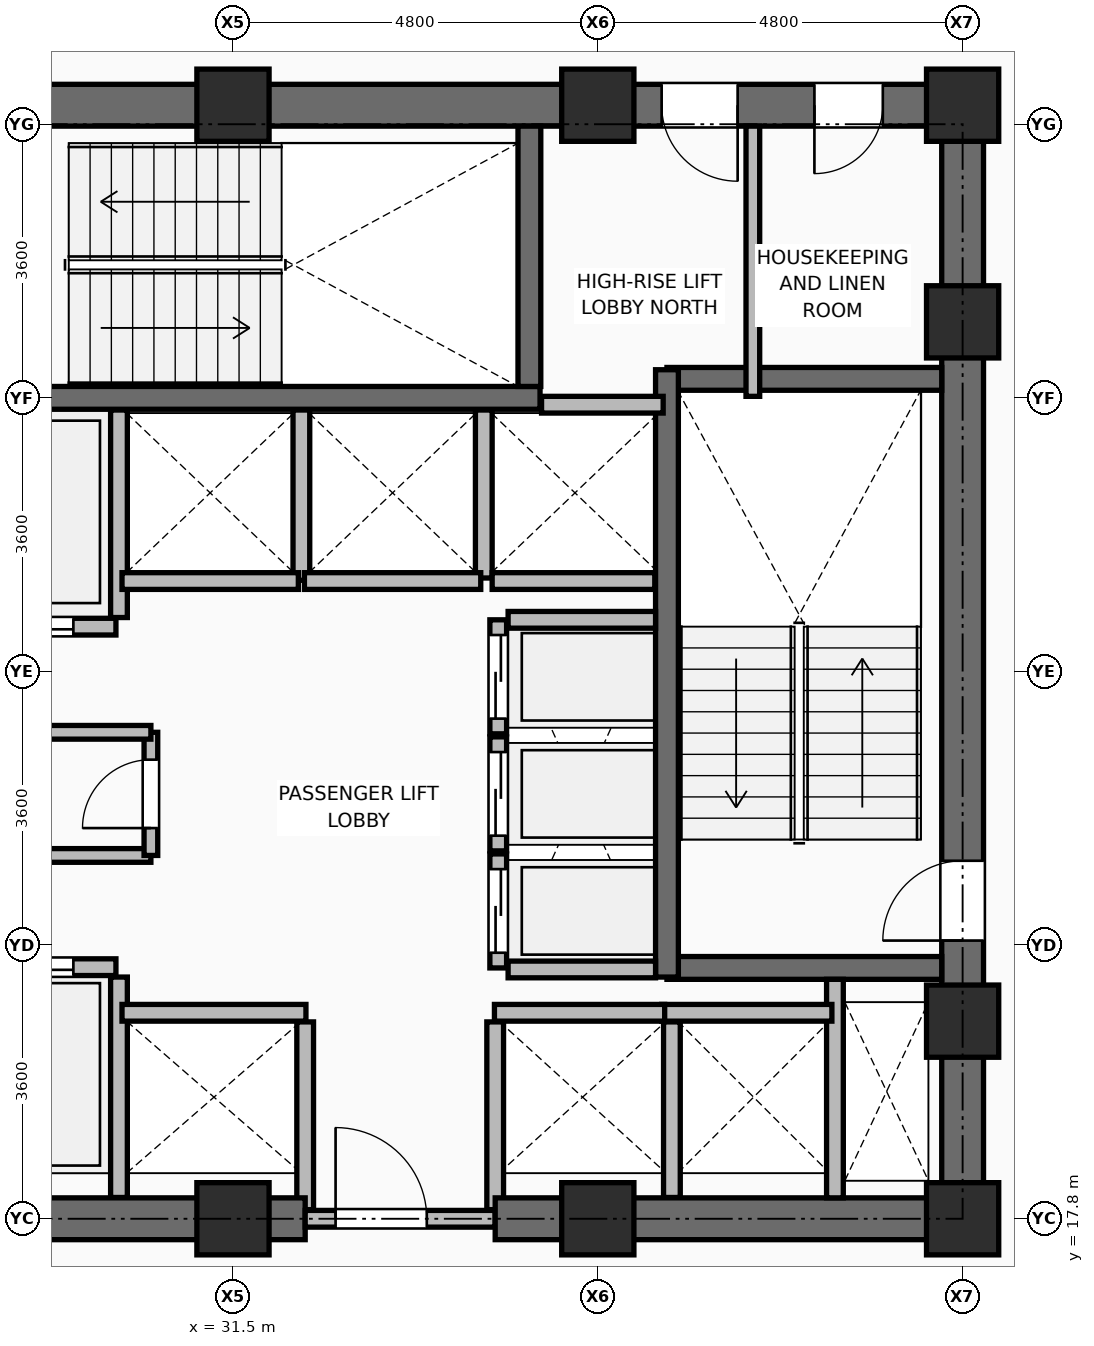
"""IFC4 building model, lengths in metres.
Left out: names, types, materials, properties, quantities, classifications, styles, units other than length and angle.
Written with IfcOpenShell. Run it as: python <this file> out.ifc"""

import sys

from ifc_helpers import new_model, si_unit, direction, frame, frame_2d, origin, origin_2d, place, context, subcontext, project, spatial, rectangle, extrude, element, fill, save


model = new_model("IFC4")
c1 = context("Model", 3, precision=1e-05, world=origin(), true_north=direction((0.0, 1.0)))
c2 = subcontext(c1, "Body", "Model", "MODEL_VIEW")
j1 = project(units=[si_unit("LENGTHUNIT", "METRE"), si_unit("PLANEANGLEUNIT", "RADIAN")], contexts=[c1])
p1 = place(None, origin())
s1 = spatial("IfcSite", under=j1, at=p1, CompositionType="ELEMENT")
p2 = place(p1, origin())
s2 = spatial("IfcBuilding", under=s1, at=p2, CompositionType="ELEMENT")
p3 = place(p2, frame((0.0, 0.0, 145.95)))
s3 = spatial("IfcBuildingStorey", under=s2, at=p3, CompositionType="ELEMENT", Elevation=145.95)
for number, where, z_axis, x_axis in (
    (1, (31.5, 17.8, 0.0), (0.0, 0.0, 1.0), (1.0, 0.0, 0.0)),
    (2, (36.3, 17.8, 0.0), (0.0, 0.0, 1.0), (1.0, 0.0, 0.0)),
    (3, (41.1, 17.8, 0.0), (0.0, 0.0, 1.0), (1.0, 0.0, 0.0)),
    (4, (41.1, 20.4, 0.0), (0.0, 0.0, 1.0), (1.0, 0.0, 0.0)),
    (5, (41.1, 29.6, 0.0), (0.0, 0.0, 1.0), (1.0, 0.0, 0.0)),
    (6, (31.5, 32.45, 0.0), (0.0, 0.0, 1.0), (1.0, 0.0, 0.0)),
    (7, (36.3, 32.45, 0.0), (0.0, 0.0, 1.0), (1.0, 0.0, 0.0)),
    (8, (41.1, 32.45, 0.0), (0.0, 0.0, 1.0), (1.0, 0.0, 0.0)),
):
    element("IfcColumn", number, at=place(p3, frame(where, z_axis=z_axis, x_axis=x_axis)), inside=s3, PredefinedType="COLUMN", context=c2, shape_type="SweptSolid", body=[
        extrude(rectangle(XDim=0.95, YDim=0.95, at=origin_2d()), origin(), (0.0, 0.0, 1.0), 3.75),
    ])
p4 = place(p3, frame((30.0, 18.08, 0.0), z_axis=(0.0, 0.0, 1.0), x_axis=(0.0, 1.0, 0.0)))
e9 = element("IfcWall", 9, at=p4, inside=s3, PredefinedType="PARTITIONING", context=c2, shape_type="SweptSolid", body=[
    extrude(rectangle(XDim=2.9, YDim=0.22, at=frame_2d((1.45, 0.0))), origin(), (0.0, 0.0, 1.0), 3.545),
])
for number, where, z_axis, x_axis in (
    (10, (32.45, 17.92, 0.0), (0.0, 0.0, 1.0), (0.0, 1.0, 0.0)),
    (11, (34.95, 17.92, 0.0), (0.0, 0.0, 1.0), (0.0, 1.0, 0.0)),
):
    element("IfcWall", number, at=place(p3, frame(where, z_axis=z_axis, x_axis=x_axis)), inside=s3, PredefinedType="PARTITIONING", context=c2, shape_type="SweptSolid", body=[
        extrude(rectangle(XDim=2.47, YDim=0.22, at=frame_2d((1.235, 0.0))), origin(), (0.0, 0.0, 1.0), 3.006),
    ])
p5 = place(p3, frame((37.275, 18.08, 0.0), z_axis=(0.0, 0.0, 1.0), x_axis=(0.0, 1.0, 0.0)))
e12 = element("IfcWall", 12, at=p5, inside=s3, PredefinedType="PARTITIONING", context=c2, shape_type="SweptSolid", body=[
    extrude(rectangle(XDim=2.31, YDim=0.22, at=frame_2d((1.155, 0.0))), origin(), (0.0, 0.0, 1.0), 3.545),
])
p6 = place(p3, frame((30.0, 25.71, 0.0), z_axis=(0.0, 0.0, 1.0), x_axis=(0.0, 1.0, 0.0)))
e13 = element("IfcWall", 13, at=p6, inside=s3, PredefinedType="PARTITIONING", context=c2, shape_type="SweptSolid", body=[
    extrude(rectangle(XDim=2.73, YDim=0.22, at=frame_2d((1.365, 0.0))), origin(), (0.0, 0.0, 1.0), 3.545),
])
p7 = place(p3, frame((32.4, 26.2, 0.0), z_axis=(0.0, 0.0, 1.0), x_axis=(0.0, 1.0, 0.0)))
e14 = element("IfcWall", 14, at=p7, inside=s3, PredefinedType="PARTITIONING", context=c2, shape_type="SweptSolid", body=[
    extrude(rectangle(XDim=2.24, YDim=0.22, at=frame_2d((1.12, 0.0))), origin(), (0.0, 0.0, 1.0), 3.545),
])
p8 = place(p3, frame((34.8, 26.23, 0.0), z_axis=(0.0, 0.0, 1.0), x_axis=(0.0, 1.0, 0.0)))
e15 = element("IfcWall", 15, at=p8, inside=s3, PredefinedType="PARTITIONING", context=c2, shape_type="SweptSolid", body=[
    extrude(rectangle(XDim=2.21, YDim=0.22, at=frame_2d((1.105, 0.0))), origin(), (0.0, 0.0, 1.0), 3.545),
])
p9 = place(p3, frame((34.91, 26.19, 0.0), z_axis=(0.0, 0.0, 1.0), x_axis=(1.0, 0.0, 0.0)))
e16 = element("IfcWall", 16, at=p9, inside=s3, PredefinedType="PARTITIONING", context=c2, shape_type="SweptSolid", body=[
    extrude(rectangle(XDim=2.14, YDim=0.22, at=frame_2d((1.07, 0.0))), origin(), (0.0, 0.0, 1.0), 3.545),
])
p10 = place(p3, frame((25.55, 17.8, 0.0), z_axis=(0.0, 0.0, 1.0), x_axis=(1.0, 0.0, 0.0)))
e17 = element("IfcWall", 17, at=p10, inside=s3, PredefinedType="SHEAR", context=c2, shape_type="SweptSolid", body=[
    extrude(rectangle(XDim=6.9, YDim=0.55, at=frame_2d((3.45, 0.0))), origin(), (0.0, 0.0, 1.0), 3.57),
])
p11 = place(p3, frame((32.45, 17.8, 0.0), z_axis=(0.0, 0.0, 1.0), x_axis=(1.0, 0.0, 0.0)))
e18 = element("IfcWall", 18, at=p11, inside=s3, PredefinedType="PARTITIONING", context=c2, shape_type="SweptSolid", body=[
    extrude(rectangle(XDim=2.5, YDim=0.22, at=frame_2d((1.25, 0.0))), origin(), (0.0, 0.0, 1.0), 3.006),
])
p12 = place(p11, frame((0.4, 0.0, 0.0)))
e19 = element("IfcOpeningElement", 19, at=p12, cuts=e18, PredefinedType="OPENING", context=c2, shape_type="SweptSolid", body=[
    extrude(rectangle(XDim=1.2, YDim=2.1, at=frame_2d((0.6, 1.05))), frame((0.0, 0.12, 0.0), z_axis=(0.0, -1.0, 0.0), x_axis=(1.0, 0.0, 0.0)), (0.0, 0.0, 1.0), 0.24),
])
p13 = place(p3, frame((34.95, 17.8, 0.0), z_axis=(0.0, 0.0, 1.0), x_axis=(1.0, 0.0, 0.0)))
e20 = element("IfcWall", 20, at=p13, inside=s3, PredefinedType="SHEAR", context=c2, shape_type="SweptSolid", body=[
    extrude(rectangle(XDim=6.425, YDim=0.55, at=frame_2d((3.212, 0.0))), origin(), (0.0, 0.0, 1.0), 3.57),
])
p14 = place(p3, frame((21.625, 32.45, 0.0), z_axis=(0.0, 0.0, 1.0), x_axis=(1.0, 0.0, 0.0)))
e21 = element("IfcWall", 21, at=p14, inside=s3, PredefinedType="SHEAR", context=c2, shape_type="SweptSolid", body=[
    extrude(rectangle(XDim=19.75, YDim=0.55, at=frame_2d((9.875, 0.0))), origin(), (0.0, 0.0, 1.0), 3.57),
])
p15 = place(p14, frame((2.125, 0.0, 0.0)))
e22 = element("IfcOpeningElement", 22, at=p15, cuts=e21, PredefinedType="OPENING", context=c2, shape_type="SweptSolid", body=[
    extrude(rectangle(XDim=1.1, YDim=2.1, at=frame_2d((0.55, 1.05))), frame((0.0, 0.285, 0.0), z_axis=(0.0, -1.0, 0.0), x_axis=(1.0, 0.0, 0.0)), (0.0, 0.0, 1.0), 0.57),
])
p16 = place(p14, frame((15.515, 0.0, 0.0)))
e23 = element("IfcOpeningElement", 23, at=p16, cuts=e21, PredefinedType="OPENING", context=c2, shape_type="SweptSolid", body=[
    extrude(rectangle(XDim=1.0, YDim=2.1, at=frame_2d((0.5, 1.05))), frame((0.0, 0.285, 0.0), z_axis=(0.0, -1.0, 0.0), x_axis=(1.0, 0.0, 0.0)), (0.0, 0.0, 1.0), 0.57),
])
p17 = place(p14, frame((17.525, 0.0, 0.0)))
e24 = element("IfcOpeningElement", 24, at=p17, cuts=e21, PredefinedType="OPENING", context=c2, shape_type="SweptSolid", body=[
    extrude(rectangle(XDim=0.9, YDim=2.1, at=frame_2d((0.45, 1.05))), frame((0.0, 0.285, 0.0), z_axis=(0.0, -1.0, 0.0), x_axis=(1.0, 0.0, 0.0)), (0.0, 0.0, 1.0), 0.57),
])
p18 = place(p3, frame((41.1, 18.075, 0.0), z_axis=(0.0, 0.0, 1.0), x_axis=(0.0, 1.0, 0.0)))
e25 = element("IfcWall", 25, at=p18, inside=s3, PredefinedType="SHEAR", context=c2, shape_type="SweptSolid", body=[
    extrude(rectangle(XDim=14.1, YDim=0.55, at=frame_2d((7.05, 0.0))), origin(), (0.0, 0.0, 1.0), 3.57),
])
p19 = place(p18, frame((3.385, 0.0, 0.0)))
e26 = element("IfcOpeningElement", 26, at=p19, cuts=e25, PredefinedType="OPENING", context=c2, shape_type="SweptSolid", body=[
    extrude(rectangle(XDim=1.05, YDim=2.1, at=frame_2d((0.525, 1.05))), frame((0.0, 0.285, 0.0), z_axis=(0.0, -1.0, 0.0), x_axis=(1.0, 0.0, 0.0)), (0.0, 0.0, 1.0), 0.57),
])
for number, where, z_axis, x_axis in (
    (27, (37.21, 21.1, 0.0), (0.0, 0.0, 1.0), (1.0, 0.0, 0.0)),
    (28, (37.21, 28.85, 0.0), (0.0, 0.0, 1.0), (1.0, 0.0, 0.0)),
):
    element("IfcWall", number, at=place(p3, frame(where, z_axis=z_axis, x_axis=x_axis)), inside=s3, PredefinedType="SHEAR", context=c2, shape_type="SweptSolid", body=[
        extrude(rectangle(XDim=3.615, YDim=0.3, at=frame_2d((1.808, 0.0))), origin(), (0.0, 0.0, 1.0), 3.57),
    ])
p20 = place(p3, frame((37.21, 20.98, 0.0), z_axis=(0.0, 0.0, 1.0), x_axis=(0.0, 1.0, 0.0)))
e29 = element("IfcWall", 29, at=p20, inside=s3, PredefinedType="SHEAR", context=c2, shape_type="SweptSolid", body=[
    extrude(rectangle(XDim=7.99, YDim=0.3, at=frame_2d((3.995, 0.0))), origin(), (0.0, 0.0, 1.0), 3.57),
])
p21 = place(p3, frame((27.51, 28.6, 0.0), z_axis=(0.0, 0.0, 1.0), x_axis=(1.0, 0.0, 0.0)))
e30 = element("IfcWall", 30, at=p21, inside=s3, PredefinedType="SHEAR", context=c2, shape_type="SweptSolid", body=[
    extrude(rectangle(XDim=8.03, YDim=0.3, at=frame_2d((4.015, 0.0))), origin(), (0.0, 0.0, 1.0), 3.57),
])
p22 = place(p3, frame((35.4, 28.75, 0.0), z_axis=(0.0, 0.0, 1.0), x_axis=(0.0, 1.0, 0.0)))
e31 = element("IfcWall", 31, at=p22, inside=s3, PredefinedType="SHEAR", context=c2, shape_type="SweptSolid", body=[
    extrude(rectangle(XDim=3.425, YDim=0.3, at=frame_2d((1.712, 0.0))), origin(), (0.0, 0.0, 1.0), 3.57),
])
p23 = place(p3, frame((39.42, 18.075, 0.0), z_axis=(0.0, 0.0, 1.0), x_axis=(0.0, 1.0, 0.0)))
e32 = element("IfcWall", 32, at=p23, inside=s3, PredefinedType="PARTITIONING", context=c2, shape_type="SweptSolid", body=[
    extrude(rectangle(XDim=2.875, YDim=0.22, at=frame_2d((1.438, 0.0))), origin(), (0.0, 0.0, 1.0), 3.55),
])
p24 = place(p3, frame((27.74, 21.11, 0.0), z_axis=(0.0, 0.0, 1.0), x_axis=(1.0, 0.0, 0.0)))
e33 = element("IfcWall", 33, at=p24, inside=s3, PredefinedType="PARTITIONING", context=c2, shape_type="SweptSolid", body=[
    extrude(rectangle(XDim=2.22, YDim=0.22, at=frame_2d((1.11, 0.0))), origin(), (0.0, 0.0, 1.0), 3.55),
])
p25 = place(p24, frame((0.56, 0.0, 0.0)))
e34 = element("IfcOpeningElement", 34, at=p25, cuts=e33, PredefinedType="OPENING", context=c2, shape_type="SweptSolid", body=[
    extrude(rectangle(XDim=1.1, YDim=2.2, at=frame_2d((0.55, 1.1))), frame((0.0, 0.12, 0.0), z_axis=(0.0, -1.0, 0.0), x_axis=(1.0, 0.0, 0.0)), (0.0, 0.0, 1.0), 0.24),
])
p26 = place(p3, frame((27.74, 25.59, 0.0), z_axis=(0.0, 0.0, 1.0), x_axis=(1.0, 0.0, 0.0)))
e35 = element("IfcWall", 35, at=p26, inside=s3, PredefinedType="PARTITIONING", context=c2, shape_type="SweptSolid", body=[
    extrude(rectangle(XDim=2.22, YDim=0.22, at=frame_2d((1.11, 0.0))), origin(), (0.0, 0.0, 1.0), 3.55),
])
p27 = place(p26, frame((0.56, 0.0, 0.0)))
e36 = element("IfcOpeningElement", 36, at=p27, cuts=e35, PredefinedType="OPENING", context=c2, shape_type="SweptSolid", body=[
    extrude(rectangle(XDim=1.1, YDim=2.2, at=frame_2d((0.55, 1.1))), frame((0.0, 0.12, 0.0), z_axis=(0.0, -1.0, 0.0), x_axis=(1.0, 0.0, 0.0)), (0.0, 0.0, 1.0), 0.24),
])
p28 = place(p3, frame((30.04, 20.51, 0.0), z_axis=(0.0, 0.0, 1.0), x_axis=(1.0, 0.0, 0.0)))
e37 = element("IfcWall", 37, at=p28, inside=s3, PredefinedType="PARTITIONING", context=c2, shape_type="SweptSolid", body=[
    extrude(rectangle(XDim=2.42, YDim=0.22, at=frame_2d((1.21, 0.0))), origin(), (0.0, 0.0, 1.0), 3.55),
])
for number, where, z_axis, x_axis in (
    (38, (37.14, 20.51, 0.0), (0.0, 0.0, 1.0), (1.0, 0.0, 0.0)),
    (39, (34.94, 20.51, 0.0), (0.0, 0.0, 1.0), (1.0, 0.0, 0.0)),
):
    element("IfcWall", number, at=place(p3, frame(where, z_axis=z_axis, x_axis=x_axis)), inside=s3, PredefinedType="PARTITIONING", context=c2, shape_type="SweptSolid", body=[
        extrude(rectangle(XDim=2.24, YDim=0.22, at=frame_2d((1.12, 0.0))), origin(), (0.0, 0.0, 1.0), 3.55),
    ])
for number, where, z_axis, x_axis in (
    (40, (30.04, 26.19, 0.0), (0.0, 0.0, 1.0), (1.0, 0.0, 0.0)),
    (41, (32.44, 26.19, 0.0), (0.0, 0.0, 1.0), (1.0, 0.0, 0.0)),
):
    element("IfcWall", number, at=place(p3, frame(where, z_axis=z_axis, x_axis=x_axis)), inside=s3, PredefinedType="PARTITIONING", context=c2, shape_type="SweptSolid", body=[
        extrude(rectangle(XDim=2.32, YDim=0.22, at=frame_2d((1.16, 0.0))), origin(), (0.0, 0.0, 1.0), 3.55),
    ])
p29 = place(p3, frame((35.56, 28.51, 0.0), z_axis=(0.0, 0.0, 1.0), x_axis=(1.0, 0.0, 0.0)))
e42 = element("IfcWall", 42, at=p29, inside=s3, PredefinedType="PARTITIONING", context=c2, shape_type="SweptSolid", body=[
    extrude(rectangle(XDim=1.6, YDim=0.22, at=frame_2d((0.8, 0.0))), origin(), (0.0, 0.0, 1.0), 3.55),
])
p30 = place(p3, frame((34.99, 21.1, 0.0), z_axis=(0.0, 0.0, 1.0), x_axis=(0.0, 1.0, 0.0)))
e43 = element("IfcWall", 43, at=p30, inside=s3, PredefinedType="PARTITIONING", context=c2, shape_type="SweptSolid", body=[
    extrude(rectangle(XDim=1.5, YDim=0.22, at=frame_2d((0.75, 0.0))), origin(), (0.0, 0.0, 1.0), 3.55),
])
p31 = place(p30, frame((0.2, 0.0, 0.0)))
e44 = element("IfcOpeningElement", 44, at=p31, cuts=e43, PredefinedType="OPENING", context=c2, shape_type="SweptSolid", body=[
    extrude(rectangle(XDim=1.1, YDim=2.2, at=frame_2d((0.55, 1.1))), frame((0.0, 0.12, 0.0), z_axis=(0.0, -1.0, 0.0), x_axis=(1.0, 0.0, 0.0)), (0.0, 0.0, 1.0), 0.24),
])
p32 = place(p3, frame((34.99, 22.64, 0.0), z_axis=(0.0, 0.0, 1.0), x_axis=(0.0, 1.0, 0.0)))
e45 = element("IfcWall", 45, at=p32, inside=s3, PredefinedType="PARTITIONING", context=c2, shape_type="SweptSolid", body=[
    extrude(rectangle(XDim=1.5, YDim=0.22, at=frame_2d((0.75, 0.0))), origin(), (0.0, 0.0, 1.0), 3.55),
])
p33 = place(p32, frame((0.2, 0.0, 0.0)))
e46 = element("IfcOpeningElement", 46, at=p33, cuts=e45, PredefinedType="OPENING", context=c2, shape_type="SweptSolid", body=[
    extrude(rectangle(XDim=1.1, YDim=2.2, at=frame_2d((0.55, 1.1))), frame((0.0, 0.12, 0.0), z_axis=(0.0, -1.0, 0.0), x_axis=(1.0, 0.0, 0.0)), (0.0, 0.0, 1.0), 0.24),
])
p34 = place(p3, frame((34.99, 24.18, 0.0), z_axis=(0.0, 0.0, 1.0), x_axis=(0.0, 1.0, 0.0)))
e47 = element("IfcWall", 47, at=p34, inside=s3, PredefinedType="PARTITIONING", context=c2, shape_type="SweptSolid", body=[
    extrude(rectangle(XDim=1.5, YDim=0.22, at=frame_2d((0.75, 0.0))), origin(), (0.0, 0.0, 1.0), 3.55),
])
p35 = place(p34, frame((0.2, 0.0, 0.0)))
e48 = element("IfcOpeningElement", 48, at=p35, cuts=e47, PredefinedType="OPENING", context=c2, shape_type="SweptSolid", body=[
    extrude(rectangle(XDim=1.1, YDim=2.2, at=frame_2d((0.55, 1.1))), frame((0.0, 0.12, 0.0), z_axis=(0.0, -1.0, 0.0), x_axis=(1.0, 0.0, 0.0)), (0.0, 0.0, 1.0), 0.24),
])
for number, where, z_axis, x_axis in (
    (49, (35.12, 21.08, 0.0), (0.0, 0.0, 1.0), (1.0, 0.0, 0.0)),
    (50, (35.12, 25.68, 0.0), (0.0, 0.0, 1.0), (1.0, 0.0, 0.0)),
):
    element("IfcWall", number, at=place(p3, frame(where, z_axis=z_axis, x_axis=x_axis)), inside=s3, PredefinedType="PARTITIONING", context=c2, shape_type="SweptSolid", body=[
        extrude(rectangle(XDim=1.94, YDim=0.22, at=frame_2d((0.97, 0.0))), origin(), (0.0, 0.0, 1.0), 3.55),
    ])
p36 = place(p3, frame((27.68, 22.58, 0.0), z_axis=(0.0, 0.0, 1.0), x_axis=(1.0, 0.0, 0.0)))
e51 = element("IfcWall", 51, at=p36, inside=s3, PredefinedType="PARTITIONING", context=c2, shape_type="SweptSolid", body=[
    extrude(rectangle(XDim=2.74, YDim=0.18, at=frame_2d((1.37, 0.0))), origin(), (0.0, 0.0, 1.0), 3.55),
])
p37 = place(p3, frame((30.42, 22.58, 0.0), z_axis=(0.0, 0.0, 1.0), x_axis=(0.0, 1.0, 0.0)))
e52 = element("IfcWall", 52, at=p37, inside=s3, PredefinedType="PARTITIONING", context=c2, shape_type="SweptSolid", body=[
    extrude(rectangle(XDim=1.62, YDim=0.18, at=frame_2d((0.81, 0.0))), origin(), (0.0, 0.0, 1.0), 3.55),
])
p38 = place(p37, frame((0.36, 0.0, 0.0)))
e53 = element("IfcOpeningElement", 53, at=p38, cuts=e52, PredefinedType="OPENING", context=c2, shape_type="SweptSolid", body=[
    extrude(rectangle(XDim=0.9, YDim=2.1, at=frame_2d((0.45, 1.05))), frame((0.0, 0.1, 0.0), z_axis=(0.0, -1.0, 0.0), x_axis=(1.0, 0.0, 0.0)), (0.0, 0.0, 1.0), 0.2),
])
p39 = place(p3, frame((27.68, 24.2, 0.0), z_axis=(0.0, 0.0, 1.0), x_axis=(1.0, 0.0, 0.0)))
e54 = element("IfcWall", 54, at=p39, inside=s3, PredefinedType="PARTITIONING", context=c2, shape_type="SweptSolid", body=[
    extrude(rectangle(XDim=2.74, YDim=0.18, at=frame_2d((1.37, 0.0))), origin(), (0.0, 0.0, 1.0), 3.55),
])
p40 = place(p3, frame((38.34, 28.62, 0.0), z_axis=(0.0, 0.0, 1.0), x_axis=(0.0, 1.0, 0.0)))
e55 = element("IfcWall", 55, at=p40, inside=s3, PredefinedType="PARTITIONING", context=c2, shape_type="SweptSolid", body=[
    extrude(rectangle(XDim=3.555, YDim=0.18, at=frame_2d((1.777, 0.0))), origin(), (0.0, 0.0, 1.0), 3.55),
])
p41 = place(p12, origin())
e56 = element("IfcDoor", 56, at=p41, inside=s3, OperationType="SINGLE_SWING_LEFT", PredefinedType="DOOR", context=c2, shape_type="SweptSolid", body=[
    extrude(rectangle(XDim=1.2, YDim=2.1, at=frame_2d((0.6, 1.05))), frame((0.0, 0.025, 0.0), z_axis=(0.0, -1.0, 0.0), x_axis=(1.0, 0.0, 0.0)), (0.0, 0.0, 1.0), 0.05),
])
fill(e19, e56)
p42 = place(p19, origin())
e57 = element("IfcDoor", 57, at=p42, inside=s3, OperationType="SINGLE_SWING_LEFT", PredefinedType="DOOR", context=c2, shape_type="SweptSolid", body=[
    extrude(rectangle(XDim=1.05, YDim=2.1, at=frame_2d((0.525, 1.05))), frame((0.0, 0.025, 0.0), z_axis=(0.0, -1.0, 0.0), x_axis=(1.0, 0.0, 0.0)), (0.0, 0.0, 1.0), 0.05),
])
fill(e26, e57)
p43 = place(p25, origin())
e58 = element("IfcDoor", 58, at=p43, inside=s3, OperationType="DOUBLE_DOOR_SLIDING", PredefinedType="DOOR", context=c2, shape_type="SweptSolid", body=[
    extrude(rectangle(XDim=1.1, YDim=2.2, at=frame_2d((0.55, 1.1))), frame((0.0, 0.025, 0.0), z_axis=(0.0, -1.0, 0.0), x_axis=(1.0, 0.0, 0.0)), (0.0, 0.0, 1.0), 0.05),
])
fill(e34, e58)
p44 = place(p27, frame((1.1, 0.0, 0.0), z_axis=(0.0, 0.0, 1.0), x_axis=(-1.0, 0.0, 0.0)))
e59 = element("IfcDoor", 59, at=p44, inside=s3, OperationType="DOUBLE_DOOR_SLIDING", PredefinedType="DOOR", context=c2, shape_type="SweptSolid", body=[
    extrude(rectangle(XDim=1.1, YDim=2.2, at=frame_2d((0.55, 1.1))), frame((0.0, 0.025, 0.0), z_axis=(0.0, -1.0, 0.0), x_axis=(1.0, 0.0, 0.0)), (0.0, 0.0, 1.0), 0.05),
])
fill(e36, e59)
p45 = place(p31, origin())
e60 = element("IfcDoor", 60, at=p45, inside=s3, OperationType="DOUBLE_DOOR_SLIDING", PredefinedType="DOOR", context=c2, shape_type="SweptSolid", body=[
    extrude(rectangle(XDim=1.1, YDim=2.2, at=frame_2d((0.55, 1.1))), frame((0.0, 0.025, 0.0), z_axis=(0.0, -1.0, 0.0), x_axis=(1.0, 0.0, 0.0)), (0.0, 0.0, 1.0), 0.05),
])
fill(e44, e60)
p46 = place(p33, origin())
e61 = element("IfcDoor", 61, at=p46, inside=s3, OperationType="DOUBLE_DOOR_SLIDING", PredefinedType="DOOR", context=c2, shape_type="SweptSolid", body=[
    extrude(rectangle(XDim=1.1, YDim=2.2, at=frame_2d((0.55, 1.1))), frame((0.0, 0.025, 0.0), z_axis=(0.0, -1.0, 0.0), x_axis=(1.0, 0.0, 0.0)), (0.0, 0.0, 1.0), 0.05),
])
fill(e46, e61)
p47 = place(p35, origin())
e62 = element("IfcDoor", 62, at=p47, inside=s3, OperationType="DOUBLE_DOOR_SLIDING", PredefinedType="DOOR", context=c2, shape_type="SweptSolid", body=[
    extrude(rectangle(XDim=1.1, YDim=2.2, at=frame_2d((0.55, 1.1))), frame((0.0, 0.025, 0.0), z_axis=(0.0, -1.0, 0.0), x_axis=(1.0, 0.0, 0.0)), (0.0, 0.0, 1.0), 0.05),
])
fill(e48, e62)
p48 = place(p38, origin())
e63 = element("IfcDoor", 63, at=p48, inside=s3, OperationType="SINGLE_SWING_LEFT", PredefinedType="DOOR", context=c2, shape_type="SweptSolid", body=[
    extrude(rectangle(XDim=0.9, YDim=2.1, at=frame_2d((0.45, 1.05))), frame((0.0, 0.025, 0.0), z_axis=(0.0, -1.0, 0.0), x_axis=(1.0, 0.0, 0.0)), (0.0, 0.0, 1.0), 0.05),
])
fill(e53, e63)
p49 = place(p16, frame((1.0, 0.0, 0.0), z_axis=(0.0, 0.0, 1.0), x_axis=(-1.0, 0.0, 0.0)))
e64 = element("IfcDoor", 64, at=p49, inside=s3, OperationType="SINGLE_SWING_LEFT", PredefinedType="DOOR", context=c2, shape_type="SweptSolid", body=[
    extrude(rectangle(XDim=1.0, YDim=2.1, at=frame_2d((0.5, 1.05))), frame((0.0, 0.025, 0.0), z_axis=(0.0, -1.0, 0.0), x_axis=(1.0, 0.0, 0.0)), (0.0, 0.0, 1.0), 0.05),
])
fill(e23, e64)
p50 = place(p17, frame((0.9, 0.0, 0.0), z_axis=(0.0, 0.0, 1.0), x_axis=(-1.0, 0.0, 0.0)))
e65 = element("IfcDoor", 65, at=p50, inside=s3, OperationType="SINGLE_SWING_RIGHT", PredefinedType="DOOR", context=c2, shape_type="SweptSolid", body=[
    extrude(rectangle(XDim=0.9, YDim=2.1, at=frame_2d((0.45, 1.05))), frame((0.0, 0.025, 0.0), z_axis=(0.0, -1.0, 0.0), x_axis=(1.0, 0.0, 0.0)), (0.0, 0.0, 1.0), 0.05),
])
fill(e24, e65)
save(model, sys.argv[1])
